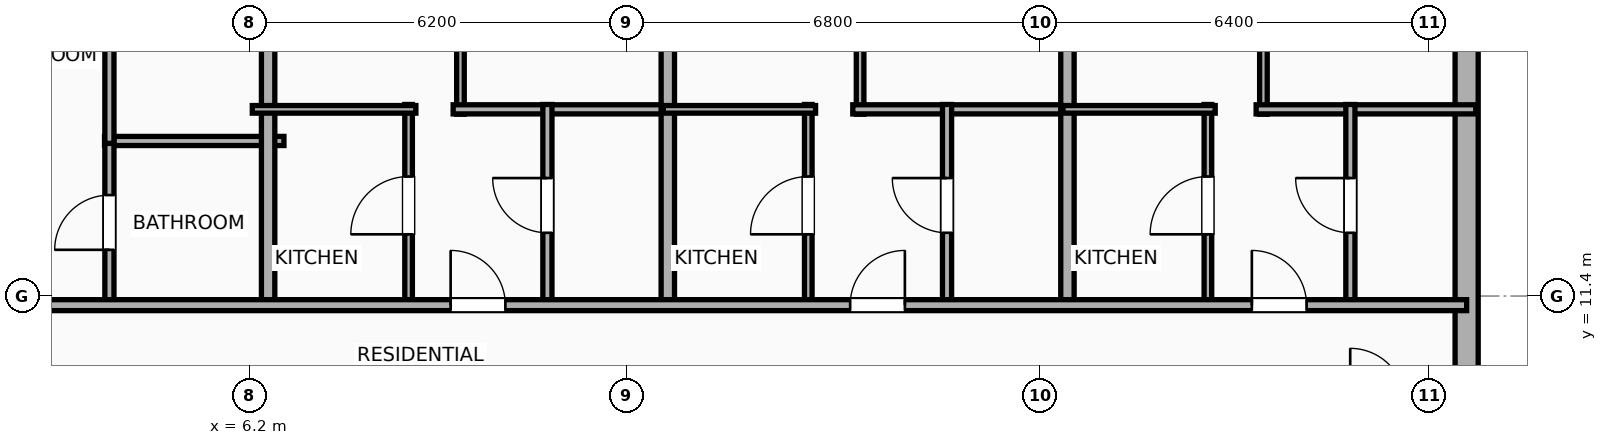
"""IFC4 building model, lengths in metres.
Left out: names, types, materials, properties, quantities, classifications, styles, units other than length and angle.
Written with IfcOpenShell. Run it as: python <this file> out.ifc"""

import sys

from ifc_helpers import new_model, si_unit, direction, frame, frame_2d, origin, place, context, subcontext, project, spatial, rectangle, extrude, element, fill, save


model = new_model("IFC4")
c1 = context("Model", 3, precision=1e-05, world=origin(), true_north=direction((0.0, 1.0)))
c2 = subcontext(c1, "Body", "Model", "MODEL_VIEW")
j1 = project(units=[si_unit("LENGTHUNIT", "METRE"), si_unit("PLANEANGLEUNIT", "RADIAN")], contexts=[c1])
p1 = place(None, origin())
s1 = spatial("IfcSite", under=j1, at=p1, CompositionType="ELEMENT")
p2 = place(p1, origin())
s2 = spatial("IfcBuilding", under=s1, at=p2, CompositionType="ELEMENT")
p3 = place(p2, frame((0.0, 0.0, 76.7)))
s3 = spatial("IfcBuildingStorey", under=s2, at=p3, CompositionType="ELEMENT", Elevation=76.7)
p4 = place(p3, frame((26.21, 18.381, 0.0), z_axis=(0.0, 0.0, 1.0), x_axis=(0.0, -1.0, 0.0)))
e1 = element("IfcWall", 1, at=p4, inside=s3, PredefinedType="ELEMENTEDWALL", context=c2, shape_type="SweptSolid", body=[
    extrude(rectangle(XDim=36.763, YDim=0.38, at=frame_2d((18.381, 0.0))), origin(), (0.0, 0.0, 1.0), 3.6),
])
p5 = place(p3, frame((3.81, 13.95, 0.0), z_axis=(0.0, 0.0, 1.0), x_axis=(1.0, 0.0, 0.0)))
e2 = element("IfcWall", 2, at=p5, inside=s3, PredefinedType="PLUMBINGWALL", context=c2, shape_type="SweptSolid", body=[
    extrude(rectangle(XDim=2.95, YDim=0.15, at=frame_2d((1.475, 0.0))), origin(), (0.0, 0.0, 1.0), 3.6),
])
p6 = place(p3, frame((3.89, 11.23, 0.0), z_axis=(0.0, 0.0, 1.0), x_axis=(0.0, 1.0, 0.0)))
e3 = element("IfcWall", 3, at=p6, inside=s3, PredefinedType="PLUMBINGWALL", context=c2, shape_type="SweptSolid", body=[
    extrude(rectangle(XDim=2.76, YDim=0.15, at=frame_2d((1.38, 0.0))), origin(), (0.0, 0.0, 1.0), 3.6),
])
p7 = place(p6, frame((0.93, 0.0, 0.0)))
e4 = element("IfcOpeningElement", 4, at=p7, cuts=e3, PredefinedType="OPENING", context=c2, shape_type="SweptSolid", body=[
    extrude(rectangle(XDim=0.9, YDim=2.05, at=frame_2d((0.45, 1.025))), frame((0.0, 0.085, 0.0), z_axis=(0.0, -1.0, 0.0), x_axis=(1.0, 0.0, 0.0)), (0.0, 0.0, 1.0), 0.17),
])
p8 = place(p3, frame((3.89, 13.91, 0.0), z_axis=(0.0, 0.0, 1.0), x_axis=(0.0, 1.0, 0.0)))
e5 = element("IfcWall", 5, at=p8, inside=s3, PredefinedType="PLUMBINGWALL", context=c2, shape_type="SweptSolid", body=[
    extrude(rectangle(XDim=8.348, YDim=0.15, at=frame_2d((4.174, 0.0))), origin(), (0.0, 0.0, 1.0), 3.6),
])
p9 = place(p8, frame((3.724, 0.0, 0.0)))
e6 = element("IfcOpeningElement", 6, at=p9, cuts=e5, PredefinedType="OPENING", context=c2, shape_type="SweptSolid", body=[
    extrude(rectangle(XDim=0.9, YDim=2.05, at=frame_2d((0.45, 1.025))), frame((0.0, 0.085, 0.0), z_axis=(0.0, -1.0, 0.0), x_axis=(1.0, 0.0, 0.0)), (0.0, 0.0, 1.0), 0.17),
])
p10 = place(p3, frame((6.5, 11.17, 0.0), z_axis=(0.0, 0.0, 1.0), x_axis=(0.0, 1.0, 0.0)))
e7 = element("IfcWall", 7, at=p10, inside=s3, PredefinedType="PARTITIONING", context=c2, shape_type="SweptSolid", body=[
    extrude(rectangle(XDim=11.04, YDim=0.22, at=frame_2d((5.52, 0.0))), origin(), (0.0, 0.0, 1.0), 3.6),
])
p11 = place(p3, frame((9.663, 14.39, 0.0), z_axis=(0.0, 0.0, 1.0), x_axis=(0.0, 1.0, 0.0)))
e8 = element("IfcWall", 8, at=p11, inside=s3, PredefinedType="PARTITIONING", context=c2, shape_type="SweptSolid", body=[
    extrude(rectangle(XDim=7.97, YDim=0.125, at=frame_2d((3.985, 0.0))), origin(), (0.0, 0.0, 1.0), 3.6),
])
p12 = place(p11, frame((1.463, 0.0, 0.0)))
e9 = element("IfcOpeningElement", 9, at=p12, cuts=e8, PredefinedType="OPENING", context=c2, shape_type="SweptSolid", body=[
    extrude(rectangle(XDim=0.9, YDim=2.05, at=frame_2d((0.45, 1.025))), frame((0.0, 0.073, 0.0), z_axis=(0.0, -1.0, 0.0), x_axis=(1.0, 0.0, 0.0)), (0.0, 0.0, 1.0), 0.145),
])
p13 = place(p3, frame((9.543, 14.47, 0.0), z_axis=(0.0, 0.0, 1.0), x_axis=(1.0, 0.0, 0.0)))
e10 = element("IfcWall", 10, at=p13, inside=s3, PredefinedType="PLUMBINGWALL", context=c2, shape_type="SweptSolid", body=[
    extrude(rectangle(XDim=3.605, YDim=0.15, at=frame_2d((1.802, 0.0))), origin(), (0.0, 0.0, 1.0), 3.6),
])
p14 = place(p3, frame((8.81, 11.23, 0.0), z_axis=(0.0, 0.0, 1.0), x_axis=(0.0, 1.0, 0.0)))
e11 = element("IfcWall", 11, at=p14, inside=s3, PredefinedType="PARTITIONING", context=c2, shape_type="SweptSolid", body=[
    extrude(rectangle(XDim=3.32, YDim=0.125, at=frame_2d((1.66, 0.0))), origin(), (0.0, 0.0, 1.0), 3.6),
])
p15 = place(p14, frame((1.185, 0.0, 0.0)))
e12 = element("IfcOpeningElement", 12, at=p15, cuts=e11, PredefinedType="OPENING", context=c2, shape_type="SweptSolid", body=[
    extrude(rectangle(XDim=0.95, YDim=2.05, at=frame_2d((0.475, 1.025))), frame((0.0, 0.073, 0.0), z_axis=(0.0, -1.0, 0.0), x_axis=(1.0, 0.0, 0.0)), (0.0, 0.0, 1.0), 0.145),
])
p16 = place(p3, frame((6.24, 14.47, 0.0), z_axis=(0.0, 0.0, 1.0), x_axis=(1.0, 0.0, 0.0)))
e13 = element("IfcWall", 13, at=p16, inside=s3, PredefinedType="PARTITIONING", context=c2, shape_type="SweptSolid", body=[
    extrude(rectangle(XDim=2.69, YDim=0.125, at=frame_2d((1.345, 0.0))), origin(), (0.0, 0.0, 1.0), 3.6),
])
p17 = place(p3, frame((11.093, 11.23, 0.0), z_axis=(0.0, 0.0, 1.0), x_axis=(0.0, 1.0, 0.0)))
e14 = element("IfcWall", 14, at=p17, inside=s3, PredefinedType="PLUMBINGWALL", context=c2, shape_type="SweptSolid", body=[
    extrude(rectangle(XDim=3.32, YDim=0.15, at=frame_2d((1.66, 0.0))), origin(), (0.0, 0.0, 1.0), 3.6),
])
p18 = place(p17, frame((1.21, 0.0, 0.0)))
e15 = element("IfcOpeningElement", 15, at=p18, cuts=e14, PredefinedType="OPENING", context=c2, shape_type="SweptSolid", body=[
    extrude(rectangle(XDim=0.9, YDim=2.05, at=frame_2d((0.45, 1.025))), frame((0.0, 0.085, 0.0), z_axis=(0.0, -1.0, 0.0), x_axis=(1.0, 0.0, 0.0)), (0.0, 0.0, 1.0), 0.17),
])
p19 = place(p3, frame((13.073, 11.17, 0.0), z_axis=(0.0, 0.0, 1.0), x_axis=(0.0, 1.0, 0.0)))
e16 = element("IfcWall", 16, at=p19, inside=s3, PredefinedType="PARTITIONING", context=c2, shape_type="SweptSolid", body=[
    extrude(rectangle(XDim=11.04, YDim=0.22, at=frame_2d((5.52, 0.0))), origin(), (0.0, 0.0, 1.0), 3.6),
])
p20 = place(p3, frame((16.235, 14.39, 0.0), z_axis=(0.0, 0.0, 1.0), x_axis=(0.0, 1.0, 0.0)))
e17 = element("IfcWall", 17, at=p20, inside=s3, PredefinedType="PARTITIONING", context=c2, shape_type="SweptSolid", body=[
    extrude(rectangle(XDim=7.97, YDim=0.125, at=frame_2d((3.985, 0.0))), origin(), (0.0, 0.0, 1.0), 3.6),
])
p21 = place(p20, frame((1.463, 0.0, 0.0)))
e18 = element("IfcOpeningElement", 18, at=p21, cuts=e17, PredefinedType="OPENING", context=c2, shape_type="SweptSolid", body=[
    extrude(rectangle(XDim=0.9, YDim=2.05, at=frame_2d((0.45, 1.025))), frame((0.0, 0.073, 0.0), z_axis=(0.0, -1.0, 0.0), x_axis=(1.0, 0.0, 0.0)), (0.0, 0.0, 1.0), 0.145),
])
p22 = place(p3, frame((16.115, 14.47, 0.0), z_axis=(0.0, 0.0, 1.0), x_axis=(1.0, 0.0, 0.0)))
e19 = element("IfcWall", 19, at=p22, inside=s3, PredefinedType="PLUMBINGWALL", context=c2, shape_type="SweptSolid", body=[
    extrude(rectangle(XDim=3.605, YDim=0.15, at=frame_2d((1.802, 0.0))), origin(), (0.0, 0.0, 1.0), 3.6),
])
p23 = place(p3, frame((15.383, 11.23, 0.0), z_axis=(0.0, 0.0, 1.0), x_axis=(0.0, 1.0, 0.0)))
e20 = element("IfcWall", 20, at=p23, inside=s3, PredefinedType="PARTITIONING", context=c2, shape_type="SweptSolid", body=[
    extrude(rectangle(XDim=3.32, YDim=0.125, at=frame_2d((1.66, 0.0))), origin(), (0.0, 0.0, 1.0), 3.6),
])
p24 = place(p23, frame((1.185, 0.0, 0.0)))
e21 = element("IfcOpeningElement", 21, at=p24, cuts=e20, PredefinedType="OPENING", context=c2, shape_type="SweptSolid", body=[
    extrude(rectangle(XDim=0.95, YDim=2.05, at=frame_2d((0.475, 1.025))), frame((0.0, 0.073, 0.0), z_axis=(0.0, -1.0, 0.0), x_axis=(1.0, 0.0, 0.0)), (0.0, 0.0, 1.0), 0.145),
])
p25 = place(p3, frame((12.998, 14.47, 0.0), z_axis=(0.0, 0.0, 1.0), x_axis=(1.0, 0.0, 0.0)))
e22 = element("IfcWall", 22, at=p25, inside=s3, PredefinedType="PARTITIONING", context=c2, shape_type="SweptSolid", body=[
    extrude(rectangle(XDim=2.505, YDim=0.125, at=frame_2d((1.252, 0.0))), origin(), (0.0, 0.0, 1.0), 3.6),
])
p26 = place(p3, frame((17.665, 11.23, 0.0), z_axis=(0.0, 0.0, 1.0), x_axis=(0.0, 1.0, 0.0)))
e23 = element("IfcWall", 23, at=p26, inside=s3, PredefinedType="PLUMBINGWALL", context=c2, shape_type="SweptSolid", body=[
    extrude(rectangle(XDim=3.32, YDim=0.15, at=frame_2d((1.66, 0.0))), origin(), (0.0, 0.0, 1.0), 3.6),
])
p27 = place(p26, frame((1.21, 0.0, 0.0)))
e24 = element("IfcOpeningElement", 24, at=p27, cuts=e23, PredefinedType="OPENING", context=c2, shape_type="SweptSolid", body=[
    extrude(rectangle(XDim=0.9, YDim=2.05, at=frame_2d((0.45, 1.025))), frame((0.0, 0.085, 0.0), z_axis=(0.0, -1.0, 0.0), x_axis=(1.0, 0.0, 0.0)), (0.0, 0.0, 1.0), 0.17),
])
p28 = place(p3, frame((19.645, 11.17, 0.0), z_axis=(0.0, 0.0, 1.0), x_axis=(0.0, 1.0, 0.0)))
e25 = element("IfcWall", 25, at=p28, inside=s3, PredefinedType="PARTITIONING", context=c2, shape_type="SweptSolid", body=[
    extrude(rectangle(XDim=11.04, YDim=0.22, at=frame_2d((5.52, 0.0))), origin(), (0.0, 0.0, 1.0), 3.6),
])
p29 = place(p3, frame((22.868, 14.39, 0.0), z_axis=(0.0, 0.0, 1.0), x_axis=(0.0, 1.0, 0.0)))
e26 = element("IfcWall", 26, at=p29, inside=s3, PredefinedType="PARTITIONING", context=c2, shape_type="SweptSolid", body=[
    extrude(rectangle(XDim=7.876, YDim=0.125, at=frame_2d((3.938, 0.0))), origin(), (0.0, 0.0, 1.0), 2.89),
])
p30 = place(p29, frame((1.44, 0.0, 0.0)))
e27 = element("IfcOpeningElement", 27, at=p30, cuts=e26, PredefinedType="OPENING", context=c2, shape_type="SweptSolid", body=[
    extrude(rectangle(XDim=0.9, YDim=2.05, at=frame_2d((0.45, 1.025))), frame((0.0, 0.073, 0.0), z_axis=(0.0, -1.0, 0.0), x_axis=(1.0, 0.0, 0.0)), (0.0, 0.0, 1.0), 0.145),
])
p31 = place(p3, frame((22.748, 14.47, 0.0), z_axis=(0.0, 0.0, 1.0), x_axis=(1.0, 0.0, 0.0)))
e28 = element("IfcWall", 28, at=p31, inside=s3, PredefinedType="PLUMBINGWALL", context=c2, shape_type="SweptSolid", body=[
    extrude(rectangle(XDim=3.612, YDim=0.15, at=frame_2d((1.806, 0.0))), origin(), (0.0, 0.0, 1.0), 3.6),
])
p32 = place(p3, frame((21.955, 11.23, 0.0), z_axis=(0.0, 0.0, 1.0), x_axis=(0.0, 1.0, 0.0)))
e29 = element("IfcWall", 29, at=p32, inside=s3, PredefinedType="PARTITIONING", context=c2, shape_type="SweptSolid", body=[
    extrude(rectangle(XDim=3.32, YDim=0.125, at=frame_2d((1.66, 0.0))), origin(), (0.0, 0.0, 1.0), 2.89),
])
p33 = place(p32, frame((1.185, 0.0, 0.0)))
e30 = element("IfcOpeningElement", 30, at=p33, cuts=e29, PredefinedType="OPENING", context=c2, shape_type="SweptSolid", body=[
    extrude(rectangle(XDim=0.95, YDim=2.05, at=frame_2d((0.475, 1.025))), frame((0.0, 0.073, 0.0), z_axis=(0.0, -1.0, 0.0), x_axis=(1.0, 0.0, 0.0)), (0.0, 0.0, 1.0), 0.145),
])
p34 = place(p3, frame((19.57, 14.47, 0.0), z_axis=(0.0, 0.0, 1.0), x_axis=(1.0, 0.0, 0.0)))
e31 = element("IfcWall", 31, at=p34, inside=s3, PredefinedType="PARTITIONING", context=c2, shape_type="SweptSolid", body=[
    extrude(rectangle(XDim=2.505, YDim=0.125, at=frame_2d((1.252, 0.0))), origin(), (0.0, 0.0, 1.0), 3.6),
])
p35 = place(p3, frame((24.298, 11.23, 0.0), z_axis=(0.0, 0.0, 1.0), x_axis=(0.0, 1.0, 0.0)))
e32 = element("IfcWall", 32, at=p35, inside=s3, PredefinedType="PLUMBINGWALL", context=c2, shape_type="SweptSolid", body=[
    extrude(rectangle(XDim=3.32, YDim=0.15, at=frame_2d((1.66, 0.0))), origin(), (0.0, 0.0, 1.0), 3.6),
])
p36 = place(p35, frame((1.21, 0.0, 0.0)))
e33 = element("IfcOpeningElement", 33, at=p36, cuts=e32, PredefinedType="OPENING", context=c2, shape_type="SweptSolid", body=[
    extrude(rectangle(XDim=0.9, YDim=2.05, at=frame_2d((0.45, 1.025))), frame((0.0, 0.085, 0.0), z_axis=(0.0, -1.0, 0.0), x_axis=(1.0, 0.0, 0.0)), (0.0, 0.0, 1.0), 0.17),
])
p37 = place(p3, frame((-33.41, 11.25, 0.0), z_axis=(0.0, 0.0, 1.0), x_axis=(1.0, 0.0, 0.0)))
e34 = element("IfcWall", 34, at=p37, inside=s3, PredefinedType="PARTITIONING", context=c2, shape_type="SweptSolid", body=[
    extrude(rectangle(XDim=59.62, YDim=0.18, at=frame_2d((29.81, 0.0))), origin(), (0.0, 0.0, 1.0), 3.6),
])
p38 = place(p37, frame((3.157, 0.0, 0.0)))
e35 = element("IfcOpeningElement", 35, at=p38, cuts=e34, PredefinedType="OPENING", context=c2, shape_type="SweptSolid", body=[
    extrude(rectangle(XDim=0.9, YDim=2.05, at=frame_2d((0.45, 1.025))), frame((0.0, 0.1, 0.0), z_axis=(0.0, -1.0, 0.0), x_axis=(1.0, 0.0, 0.0)), (0.0, 0.0, 1.0), 0.2),
])
p39 = place(p37, frame((10.145, 0.0, 0.0)))
e36 = element("IfcOpeningElement", 36, at=p39, cuts=e34, PredefinedType="OPENING", context=c2, shape_type="SweptSolid", body=[
    extrude(rectangle(XDim=0.9, YDim=2.05, at=frame_2d((0.45, 1.025))), frame((0.0, 0.1, 0.0), z_axis=(0.0, -1.0, 0.0), x_axis=(1.0, 0.0, 0.0)), (0.0, 0.0, 1.0), 0.2),
])
p40 = place(p37, frame((17.86, 0.0, 0.0)))
e37 = element("IfcOpeningElement", 37, at=p40, cuts=e34, PredefinedType="OPENING", context=c2, shape_type="SweptSolid", body=[
    extrude(rectangle(XDim=1.15, YDim=2.05, at=frame_2d((0.575, 1.025))), frame((0.0, 0.1, 0.0), z_axis=(0.0, -1.0, 0.0), x_axis=(1.0, 0.0, 0.0)), (0.0, 0.0, 1.0), 0.2),
])
p41 = place(p37, frame((23.338, 0.0, 0.0)))
e38 = element("IfcOpeningElement", 38, at=p41, cuts=e34, PredefinedType="OPENING", context=c2, shape_type="SweptSolid", body=[
    extrude(rectangle(XDim=0.9, YDim=2.05, at=frame_2d((0.45, 1.025))), frame((0.0, 0.1, 0.0), z_axis=(0.0, -1.0, 0.0), x_axis=(1.0, 0.0, 0.0)), (0.0, 0.0, 1.0), 0.2),
])
p42 = place(p37, frame((30.719, 0.0, 0.0)))
e39 = element("IfcOpeningElement", 39, at=p42, cuts=e34, PredefinedType="OPENING", context=c2, shape_type="SweptSolid", body=[
    extrude(rectangle(XDim=1.15, YDim=2.05, at=frame_2d((0.575, 1.025))), frame((0.0, 0.1, 0.0), z_axis=(0.0, -1.0, 0.0), x_axis=(1.0, 0.0, 0.0)), (0.0, 0.0, 1.0), 0.2),
])
p43 = place(p37, frame((34.81, 0.0, 0.0)))
e40 = element("IfcOpeningElement", 40, at=p43, cuts=e34, PredefinedType="OPENING", context=c2, shape_type="SweptSolid", body=[
    extrude(rectangle(XDim=1.15, YDim=2.05, at=frame_2d((0.575, 1.025))), frame((0.0, 0.1, 0.0), z_axis=(0.0, -1.0, 0.0), x_axis=(1.0, 0.0, 0.0)), (0.0, 0.0, 1.0), 0.2),
])
p44 = place(p37, frame((42.912, 0.0, 0.0)))
e41 = element("IfcOpeningElement", 41, at=p44, cuts=e34, PredefinedType="OPENING", context=c2, shape_type="SweptSolid", body=[
    extrude(rectangle(XDim=0.9, YDim=2.05, at=frame_2d((0.45, 1.025))), frame((0.0, 0.1, 0.0), z_axis=(0.0, -1.0, 0.0), x_axis=(1.0, 0.0, 0.0)), (0.0, 0.0, 1.0), 0.2),
])
p45 = place(p37, frame((49.482, 0.0, 0.0)))
e42 = element("IfcOpeningElement", 42, at=p45, cuts=e34, PredefinedType="OPENING", context=c2, shape_type="SweptSolid", body=[
    extrude(rectangle(XDim=0.9, YDim=2.05, at=frame_2d((0.45, 1.025))), frame((0.0, 0.1, 0.0), z_axis=(0.0, -1.0, 0.0), x_axis=(1.0, 0.0, 0.0)), (0.0, 0.0, 1.0), 0.2),
])
p46 = place(p37, frame((56.088, 0.0, 0.0)))
e43 = element("IfcOpeningElement", 43, at=p46, cuts=e34, PredefinedType="OPENING", context=c2, shape_type="SweptSolid", body=[
    extrude(rectangle(XDim=0.9, YDim=2.05, at=frame_2d((0.45, 1.025))), frame((0.0, 0.1, 0.0), z_axis=(0.0, -1.0, 0.0), x_axis=(1.0, 0.0, 0.0)), (0.0, 0.0, 1.0), 0.2),
])
p47 = place(p7, origin())
e44 = element("IfcDoor", 44, at=p47, inside=s3, OperationType="SINGLE_SWING_LEFT", PredefinedType="DOOR", context=c2, shape_type="SweptSolid", body=[
    extrude(rectangle(XDim=0.9, YDim=2.05, at=frame_2d((0.45, 1.025))), frame((0.0, 0.025, 0.0), z_axis=(0.0, -1.0, 0.0), x_axis=(1.0, 0.0, 0.0)), (0.0, 0.0, 1.0), 0.05),
])
fill(e4, e44)
p48 = place(p15, origin())
e45 = element("IfcDoor", 45, at=p48, inside=s3, OperationType="SINGLE_SWING_LEFT", PredefinedType="DOOR", context=c2, shape_type="SweptSolid", body=[
    extrude(rectangle(XDim=0.95, YDim=2.05, at=frame_2d((0.475, 1.025))), frame((0.0, 0.025, 0.0), z_axis=(0.0, -1.0, 0.0), x_axis=(1.0, 0.0, 0.0)), (0.0, 0.0, 1.0), 0.05),
])
fill(e12, e45)
p49 = place(p18, origin())
e46 = element("IfcDoor", 46, at=p49, inside=s3, OperationType="SINGLE_SWING_RIGHT", PredefinedType="DOOR", context=c2, shape_type="SweptSolid", body=[
    extrude(rectangle(XDim=0.9, YDim=2.05, at=frame_2d((0.45, 1.025))), frame((0.0, 0.025, 0.0), z_axis=(0.0, -1.0, 0.0), x_axis=(1.0, 0.0, 0.0)), (0.0, 0.0, 1.0), 0.05),
])
fill(e15, e46)
p50 = place(p24, origin())
e47 = element("IfcDoor", 47, at=p50, inside=s3, OperationType="SINGLE_SWING_LEFT", PredefinedType="DOOR", context=c2, shape_type="SweptSolid", body=[
    extrude(rectangle(XDim=0.95, YDim=2.05, at=frame_2d((0.475, 1.025))), frame((0.0, 0.025, 0.0), z_axis=(0.0, -1.0, 0.0), x_axis=(1.0, 0.0, 0.0)), (0.0, 0.0, 1.0), 0.05),
])
fill(e21, e47)
p51 = place(p27, origin())
e48 = element("IfcDoor", 48, at=p51, inside=s3, OperationType="SINGLE_SWING_RIGHT", PredefinedType="DOOR", context=c2, shape_type="SweptSolid", body=[
    extrude(rectangle(XDim=0.9, YDim=2.05, at=frame_2d((0.45, 1.025))), frame((0.0, 0.025, 0.0), z_axis=(0.0, -1.0, 0.0), x_axis=(1.0, 0.0, 0.0)), (0.0, 0.0, 1.0), 0.05),
])
fill(e24, e48)
p52 = place(p33, origin())
e49 = element("IfcDoor", 49, at=p52, inside=s3, OperationType="SINGLE_SWING_LEFT", PredefinedType="DOOR", context=c2, shape_type="SweptSolid", body=[
    extrude(rectangle(XDim=0.95, YDim=2.05, at=frame_2d((0.475, 1.025))), frame((0.0, 0.025, 0.0), z_axis=(0.0, -1.0, 0.0), x_axis=(1.0, 0.0, 0.0)), (0.0, 0.0, 1.0), 0.05),
])
fill(e30, e49)
p53 = place(p36, origin())
e50 = element("IfcDoor", 50, at=p53, inside=s3, OperationType="SINGLE_SWING_RIGHT", PredefinedType="DOOR", context=c2, shape_type="SweptSolid", body=[
    extrude(rectangle(XDim=0.9, YDim=2.05, at=frame_2d((0.45, 1.025))), frame((0.0, 0.025, 0.0), z_axis=(0.0, -1.0, 0.0), x_axis=(1.0, 0.0, 0.0)), (0.0, 0.0, 1.0), 0.05),
])
fill(e33, e50)
p54 = place(p44, origin())
e51 = element("IfcDoor", 51, at=p54, inside=s3, OperationType="SINGLE_SWING_LEFT", PredefinedType="DOOR", context=c2, shape_type="SweptSolid", body=[
    extrude(rectangle(XDim=0.9, YDim=2.05, at=frame_2d((0.45, 1.025))), frame((0.0, 0.025, 0.0), z_axis=(0.0, -1.0, 0.0), x_axis=(1.0, 0.0, 0.0)), (0.0, 0.0, 1.0), 0.05),
])
fill(e41, e51)
p55 = place(p45, origin())
e52 = element("IfcDoor", 52, at=p55, inside=s3, OperationType="SINGLE_SWING_RIGHT", PredefinedType="DOOR", context=c2, shape_type="SweptSolid", body=[
    extrude(rectangle(XDim=0.9, YDim=2.05, at=frame_2d((0.45, 1.025))), frame((0.0, 0.025, 0.0), z_axis=(0.0, -1.0, 0.0), x_axis=(1.0, 0.0, 0.0)), (0.0, 0.0, 1.0), 0.05),
])
fill(e42, e52)
p56 = place(p46, origin())
e53 = element("IfcDoor", 53, at=p56, inside=s3, OperationType="SINGLE_SWING_LEFT", PredefinedType="DOOR", context=c2, shape_type="SweptSolid", body=[
    extrude(rectangle(XDim=0.9, YDim=2.05, at=frame_2d((0.45, 1.025))), frame((0.0, 0.025, 0.0), z_axis=(0.0, -1.0, 0.0), x_axis=(1.0, 0.0, 0.0)), (0.0, 0.0, 1.0), 0.05),
])
fill(e43, e53)
save(model, sys.argv[1])
